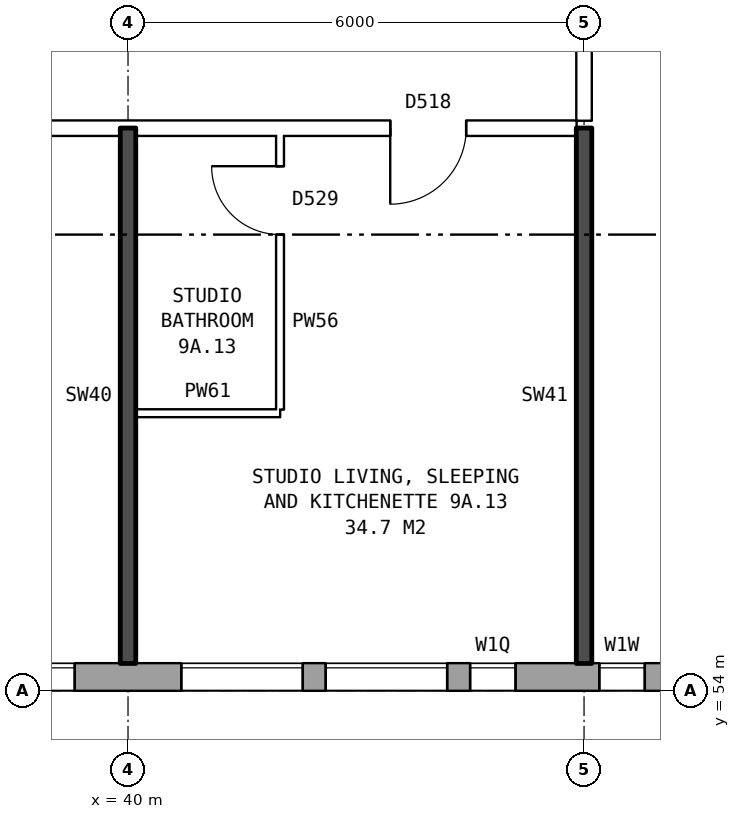
"""IFC4 building model, lengths in metres.
Left out: names, types, materials, properties, quantities, classifications, styles, units other than length and angle.
Written with IfcOpenShell. Run it as: python <this file> out.ifc"""

import sys

from ifc_helpers import new_model, si_unit, direction, frame, frame_2d, origin, place, context, subcontext, project, spatial, rectangle, extrude, element, fill, save


model = new_model("IFC4")
c1 = context("Model", 3, precision=1e-05, world=origin(), true_north=direction((0.0, 1.0)))
c2 = subcontext(c1, "Body", "Model", "MODEL_VIEW")
j1 = project(units=[si_unit("LENGTHUNIT", "METRE"), si_unit("PLANEANGLEUNIT", "RADIAN")], contexts=[c1])
p1 = place(None, origin())
s1 = spatial("IfcSite", under=j1, at=p1, CompositionType="ELEMENT")
p2 = place(p1, origin())
s2 = spatial("IfcBuilding", under=s1, at=p2, CompositionType="ELEMENT")
p3 = place(p2, frame((0.0, 0.0, 35.0)))
s3 = spatial("IfcBuildingStorey", under=s2, at=p3, CompositionType="ELEMENT", Elevation=35.0)
p4 = place(p3, frame((22.825, 54.18, 0.0), z_axis=(0.0, 0.0, 1.0), x_axis=(1.0, 0.0, 0.0)))
e1 = element("IfcWall", 1, at=p4, inside=s3, PredefinedType="STANDARD", context=c2, shape_type="SweptSolid", body=[
    extrude(rectangle(XDim=50.101, YDim=0.36, at=frame_2d((25.05, 0.0))), origin(), (0.0, 0.0, 1.0), 2.85),
])
p5 = place(p4, frame((2.875, 0.0, 0.8)))
e2 = element("IfcOpeningElement", 2, at=p5, cuts=e1, PredefinedType="OPENING", context=c2, shape_type="SweptSolid", body=[
    extrude(rectangle(XDim=1.6, YDim=1.8, at=frame_2d((0.8, 0.9))), frame((0.0, 0.19, 0.0), z_axis=(0.0, -1.0, 0.0), x_axis=(1.0, 0.0, 0.0)), (0.0, 0.0, 1.0), 0.38),
])
p6 = place(p4, frame((5.875, 0.0, 0.8)))
e3 = element("IfcOpeningElement", 3, at=p6, cuts=e1, PredefinedType="OPENING", context=c2, shape_type="SweptSolid", body=[
    extrude(rectangle(XDim=1.6, YDim=1.8, at=frame_2d((0.8, 0.9))), frame((0.0, 0.19, 0.0), z_axis=(0.0, -1.0, 0.0), x_axis=(1.0, 0.0, 0.0)), (0.0, 0.0, 1.0), 0.38),
])
p7 = place(p4, frame((8.875, 0.0, 0.8)))
e4 = element("IfcOpeningElement", 4, at=p7, cuts=e1, PredefinedType="OPENING", context=c2, shape_type="SweptSolid", body=[
    extrude(rectangle(XDim=1.6, YDim=1.8, at=frame_2d((0.8, 0.9))), frame((0.0, 0.19, 0.0), z_axis=(0.0, -1.0, 0.0), x_axis=(1.0, 0.0, 0.0)), (0.0, 0.0, 1.0), 0.38),
])
p8 = place(p4, frame((11.875, 0.0, 0.8)))
e5 = element("IfcOpeningElement", 5, at=p8, cuts=e1, PredefinedType="OPENING", context=c2, shape_type="SweptSolid", body=[
    extrude(rectangle(XDim=1.6, YDim=1.8, at=frame_2d((0.8, 0.9))), frame((0.0, 0.19, 0.0), z_axis=(0.0, -1.0, 0.0), x_axis=(1.0, 0.0, 0.0)), (0.0, 0.0, 1.0), 0.38),
])
p9 = place(p4, frame((14.875, 0.0, 0.8)))
e6 = element("IfcOpeningElement", 6, at=p9, cuts=e1, PredefinedType="OPENING", context=c2, shape_type="SweptSolid", body=[
    extrude(rectangle(XDim=1.6, YDim=1.8, at=frame_2d((0.8, 0.9))), frame((0.0, 0.19, 0.0), z_axis=(0.0, -1.0, 0.0), x_axis=(1.0, 0.0, 0.0)), (0.0, 0.0, 1.0), 0.38),
])
p10 = place(p4, frame((17.875, 0.0, 0.8)))
e7 = element("IfcOpeningElement", 7, at=p10, cuts=e1, PredefinedType="OPENING", context=c2, shape_type="SweptSolid", body=[
    extrude(rectangle(XDim=1.6, YDim=1.8, at=frame_2d((0.8, 0.9))), frame((0.0, 0.19, 0.0), z_axis=(0.0, -1.0, 0.0), x_axis=(1.0, 0.0, 0.0)), (0.0, 0.0, 1.0), 0.38),
])
p11 = place(p4, frame((19.775, 0.0, 0.8)))
e8 = element("IfcOpeningElement", 8, at=p11, cuts=e1, PredefinedType="OPENING", context=c2, shape_type="SweptSolid", body=[
    extrude(rectangle(XDim=1.6, YDim=1.8, at=frame_2d((0.8, 0.9))), frame((0.0, 0.19, 0.0), z_axis=(0.0, -1.0, 0.0), x_axis=(1.0, 0.0, 0.0)), (0.0, 0.0, 1.0), 0.38),
])
p12 = place(p4, frame((23.375, 0.0, 0.15)))
e9 = element("IfcOpeningElement", 9, at=p12, cuts=e1, PredefinedType="OPENING", context=c2, shape_type="SweptSolid", body=[
    extrude(rectangle(XDim=0.6, YDim=0.9, at=frame_2d((0.3, 0.45))), frame((0.0, 0.19, 0.0), z_axis=(0.0, -1.0, 0.0), x_axis=(1.0, 0.0, 0.0)), (0.0, 0.0, 1.0), 0.38),
])
p13 = place(p4, frame((27.275, 0.0, 1.7)))
e10 = element("IfcOpeningElement", 10, at=p13, cuts=e1, PredefinedType="OPENING", context=c2, shape_type="SweptSolid", body=[
    extrude(rectangle(XDim=0.6, YDim=0.9, at=frame_2d((0.3, 0.45))), frame((0.0, 0.19, 0.0), z_axis=(0.0, -1.0, 0.0), x_axis=(1.0, 0.0, 0.0)), (0.0, 0.0, 1.0), 0.38),
])
p14 = place(p4, frame((29.875, 0.0, 0.8)))
e11 = element("IfcOpeningElement", 11, at=p14, cuts=e1, PredefinedType="OPENING", context=c2, shape_type="SweptSolid", body=[
    extrude(rectangle(XDim=1.6, YDim=1.8, at=frame_2d((0.8, 0.9))), frame((0.0, 0.19, 0.0), z_axis=(0.0, -1.0, 0.0), x_axis=(1.0, 0.0, 0.0)), (0.0, 0.0, 1.0), 0.38),
])
p15 = place(p4, frame((32.875, 0.0, 0.8)))
e12 = element("IfcOpeningElement", 12, at=p15, cuts=e1, PredefinedType="OPENING", context=c2, shape_type="SweptSolid", body=[
    extrude(rectangle(XDim=1.6, YDim=1.8, at=frame_2d((0.8, 0.9))), frame((0.0, 0.19, 0.0), z_axis=(0.0, -1.0, 0.0), x_axis=(1.0, 0.0, 0.0)), (0.0, 0.0, 1.0), 0.38),
])
p16 = place(p4, frame((35.875, 0.0, 0.8)))
e13 = element("IfcOpeningElement", 13, at=p16, cuts=e1, PredefinedType="OPENING", context=c2, shape_type="SweptSolid", body=[
    extrude(rectangle(XDim=1.6, YDim=1.8, at=frame_2d((0.8, 0.9))), frame((0.0, 0.19, 0.0), z_axis=(0.0, -1.0, 0.0), x_axis=(1.0, 0.0, 0.0)), (0.0, 0.0, 1.0), 0.38),
])
p17 = place(p4, frame((38.875, 0.0, 0.8)))
e14 = element("IfcOpeningElement", 14, at=p17, cuts=e1, PredefinedType="OPENING", context=c2, shape_type="SweptSolid", body=[
    extrude(rectangle(XDim=1.6, YDim=1.8, at=frame_2d((0.8, 0.9))), frame((0.0, 0.19, 0.0), z_axis=(0.0, -1.0, 0.0), x_axis=(1.0, 0.0, 0.0)), (0.0, 0.0, 1.0), 0.38),
])
p18 = place(p4, frame((41.875, 0.0, 0.8)))
e15 = element("IfcOpeningElement", 15, at=p18, cuts=e1, PredefinedType="OPENING", context=c2, shape_type="SweptSolid", body=[
    extrude(rectangle(XDim=1.6, YDim=1.8, at=frame_2d((0.8, 0.9))), frame((0.0, 0.19, 0.0), z_axis=(0.0, -1.0, 0.0), x_axis=(1.0, 0.0, 0.0)), (0.0, 0.0, 1.0), 0.38),
])
p19 = place(p4, frame((44.875, 0.0, 0.8)))
e16 = element("IfcOpeningElement", 16, at=p19, cuts=e1, PredefinedType="OPENING", context=c2, shape_type="SweptSolid", body=[
    extrude(rectangle(XDim=1.6, YDim=1.8, at=frame_2d((0.8, 0.9))), frame((0.0, 0.19, 0.0), z_axis=(0.0, -1.0, 0.0), x_axis=(1.0, 0.0, 0.0)), (0.0, 0.0, 1.0), 0.38),
])
p20 = place(p4, frame((47.875, 0.0, 0.8)))
e17 = element("IfcOpeningElement", 17, at=p20, cuts=e1, PredefinedType="OPENING", context=c2, shape_type="SweptSolid", body=[
    extrude(rectangle(XDim=1.6, YDim=1.8, at=frame_2d((0.8, 0.9))), frame((0.0, 0.19, 0.0), z_axis=(0.0, -1.0, 0.0), x_axis=(1.0, 0.0, 0.0)), (0.0, 0.0, 1.0), 0.38),
])
p21 = place(p4, frame((21.675, 0.0, 1.4)))
e18 = element("IfcOpeningElement", 18, at=p21, cuts=e1, PredefinedType="OPENING", context=c2, shape_type="SweptSolid", body=[
    extrude(rectangle(XDim=0.6, YDim=1.2, at=frame_2d((0.3, 0.6))), frame((0.0, 0.19, 0.0), z_axis=(0.0, -1.0, 0.0), x_axis=(1.0, 0.0, 0.0)), (0.0, 0.0, 1.0), 0.38),
])
p22 = place(p4, frame((24.275, 0.0, 0.15)))
e19 = element("IfcOpeningElement", 19, at=p22, cuts=e1, PredefinedType="OPENING", context=c2, shape_type="SweptSolid", body=[
    extrude(rectangle(XDim=1.6, YDim=1.5, at=frame_2d((0.8, 0.75))), frame((0.0, 0.19, 0.0), z_axis=(0.0, -1.0, 0.0), x_axis=(1.0, 0.0, 0.0)), (0.0, 0.0, 1.0), 0.38),
])
p23 = place(p4, frame((28.175, 0.0, 1.1)))
e20 = element("IfcOpeningElement", 20, at=p23, cuts=e1, PredefinedType="OPENING", context=c2, shape_type="SweptSolid", body=[
    extrude(rectangle(XDim=0.8, YDim=1.5, at=frame_2d((0.4, 0.75))), frame((0.0, 0.19, 0.0), z_axis=(0.0, -1.0, 0.0), x_axis=(1.0, 0.0, 0.0)), (0.0, 0.0, 1.0), 0.38),
])
p24 = place(p3, frame((40.1, 57.65, 0.0), z_axis=(0.0, 0.0, 1.0), x_axis=(1.0, 0.0, 0.0)))
e21 = element("IfcWall", 21, at=p24, inside=s3, PredefinedType="PARTITIONING", context=c2, shape_type="SweptSolid", body=[
    extrude(rectangle(XDim=1.9, YDim=0.1, at=frame_2d((0.95, 0.0))), origin(), (0.0, 0.0, 1.0), 2.85),
])
p25 = place(p3, frame((20.11, 61.4, 0.0), z_axis=(0.0, 0.0, 1.0), x_axis=(1.0, 0.0, 0.0)))
e22 = element("IfcWall", 22, at=p25, inside=s3, PredefinedType="PARTITIONING", context=c2, shape_type="SweptSolid", body=[
    extrude(rectangle(XDim=25.79, YDim=0.2, at=frame_2d((12.895, 0.0))), origin(), (0.0, 0.0, 1.0), 2.85),
])
p26 = place(p25, frame((23.34, 0.0, 0.0)))
e23 = element("IfcOpeningElement", 23, at=p26, cuts=e22, PredefinedType="OPENING", context=c2, shape_type="SweptSolid", body=[
    extrude(rectangle(XDim=1.0, YDim=2.1, at=frame_2d((0.5, 1.05))), frame((0.0, 0.11, 0.0), z_axis=(0.0, -1.0, 0.0), x_axis=(1.0, 0.0, 0.0)), (0.0, 0.0, 1.0), 0.22),
])
p27 = place(p25, frame((17.39, 0.0, 0.0)))
e24 = element("IfcOpeningElement", 24, at=p27, cuts=e22, PredefinedType="OPENING", context=c2, shape_type="SweptSolid", body=[
    extrude(rectangle(XDim=1.0, YDim=2.1, at=frame_2d((0.5, 1.05))), frame((0.0, 0.11, 0.0), z_axis=(0.0, -1.0, 0.0), x_axis=(1.0, 0.0, 0.0)), (0.0, 0.0, 1.0), 0.22),
])
p28 = place(p25, frame((11.39, 0.0, 0.0)))
e25 = element("IfcOpeningElement", 25, at=p28, cuts=e22, PredefinedType="OPENING", context=c2, shape_type="SweptSolid", body=[
    extrude(rectangle(XDim=1.0, YDim=2.1, at=frame_2d((0.5, 1.05))), frame((0.0, 0.11, 0.0), z_axis=(0.0, -1.0, 0.0), x_axis=(1.0, 0.0, 0.0)), (0.0, 0.0, 1.0), 0.22),
])
p29 = place(p25, frame((2.245, 0.0, 0.0)))
e26 = element("IfcOpeningElement", 26, at=p29, cuts=e22, PredefinedType="OPENING", context=c2, shape_type="SweptSolid", body=[
    extrude(rectangle(XDim=1.0, YDim=2.1, at=frame_2d((0.5, 1.05))), frame((0.0, 0.11, 0.0), z_axis=(0.0, -1.0, 0.0), x_axis=(1.0, 0.0, 0.0)), (0.0, 0.0, 1.0), 0.22),
])
p30 = place(p3, frame((40.0, 54.36, 0.0), z_axis=(0.0, 0.0, 1.0), x_axis=(0.0, 1.0, 0.0)))
e27 = element("IfcWall", 27, at=p30, inside=s3, PredefinedType="SOLIDWALL", context=c2, shape_type="SweptSolid", body=[
    extrude(rectangle(XDim=7.04, YDim=0.2, at=frame_2d((3.52, 0.0))), origin(), (0.0, 0.0, 1.0), 2.85),
])
p31 = place(p3, frame((42.0, 57.7, 0.0), z_axis=(0.0, 0.0, 1.0), x_axis=(0.0, 1.0, 0.0)))
e28 = element("IfcWall", 28, at=p31, inside=s3, PredefinedType="PARTITIONING", context=c2, shape_type="SweptSolid", body=[
    extrude(rectangle(XDim=3.6, YDim=0.1, at=frame_2d((1.8, 0.0))), origin(), (0.0, 0.0, 1.0), 2.85),
])
p32 = place(p31, frame((2.3, 0.0, 0.0)))
e29 = element("IfcOpeningElement", 29, at=p32, cuts=e28, PredefinedType="OPENING", context=c2, shape_type="SweptSolid", body=[
    extrude(rectangle(XDim=0.9, YDim=2.1, at=frame_2d((0.45, 1.05))), frame((0.0, 0.06, 0.0), z_axis=(0.0, -1.0, 0.0), x_axis=(1.0, 0.0, 0.0)), (0.0, 0.0, 1.0), 0.12),
])
p33 = place(p3, frame((46.0, 54.36, 0.0), z_axis=(0.0, 0.0, 1.0), x_axis=(0.0, 1.0, 0.0)))
e30 = element("IfcWall", 30, at=p33, inside=s3, PredefinedType="SOLIDWALL", context=c2, shape_type="SweptSolid", body=[
    extrude(rectangle(XDim=7.04, YDim=0.2, at=frame_2d((3.52, 0.0))), origin(), (0.0, 0.0, 1.0), 2.85),
])
p34 = place(p3, frame((46.0, 61.5, 0.0), z_axis=(0.0, 0.0, 1.0), x_axis=(0.0, 1.0, 0.0)))
e31 = element("IfcWall", 31, at=p34, inside=s3, PredefinedType="PARTITIONING", context=c2, shape_type="SweptSolid", body=[
    extrude(rectangle(XDim=2.2, YDim=0.2, at=frame_2d((1.1, 0.0))), origin(), (0.0, 0.0, 1.0), 2.85),
])
p35 = place(p9, origin())
e32 = element("IfcWindow", 32, at=p35, inside=s3, PartitioningType="SINGLE_PANEL", PredefinedType="WINDOW", context=c2, shape_type="SweptSolid", body=[
    extrude(rectangle(XDim=1.6, YDim=1.8, at=frame_2d((0.8, 0.9))), frame((0.0, 0.15, 0.0), z_axis=(0.0, -1.0, 0.0), x_axis=(1.0, 0.0, 0.0)), (0.0, 0.0, 1.0), 0.06),
])
fill(e6, e32)
p36 = place(p10, origin())
e33 = element("IfcWindow", 33, at=p36, inside=s3, PartitioningType="SINGLE_PANEL", PredefinedType="WINDOW", context=c2, shape_type="SweptSolid", body=[
    extrude(rectangle(XDim=1.6, YDim=1.8, at=frame_2d((0.8, 0.9))), frame((0.0, 0.15, 0.0), z_axis=(0.0, -1.0, 0.0), x_axis=(1.0, 0.0, 0.0)), (0.0, 0.0, 1.0), 0.06),
])
fill(e7, e33)
p37 = place(p11, origin())
e34 = element("IfcWindow", 34, at=p37, inside=s3, PartitioningType="SINGLE_PANEL", PredefinedType="WINDOW", context=c2, shape_type="SweptSolid", body=[
    extrude(rectangle(XDim=1.6, YDim=1.8, at=frame_2d((0.8, 0.9))), frame((0.0, 0.15, 0.0), z_axis=(0.0, -1.0, 0.0), x_axis=(1.0, 0.0, 0.0)), (0.0, 0.0, 1.0), 0.06),
])
fill(e8, e34)
p38 = place(p12, origin())
e35 = element("IfcWindow", 35, at=p38, inside=s3, PartitioningType="SINGLE_PANEL", PredefinedType="WINDOW", context=c2, shape_type="SweptSolid", body=[
    extrude(rectangle(XDim=0.6, YDim=0.9, at=frame_2d((0.3, 0.45))), frame((0.0, 0.15, 0.0), z_axis=(0.0, -1.0, 0.0), x_axis=(1.0, 0.0, 0.0)), (0.0, 0.0, 1.0), 0.06),
])
fill(e9, e35)
p39 = place(p26, frame((1.0, 0.0, 0.0), z_axis=(0.0, 0.0, 1.0), x_axis=(-1.0, 0.0, 0.0)))
e36 = element("IfcDoor", 36, at=p39, inside=s3, OperationType="SINGLE_SWING_RIGHT", PredefinedType="DOOR", context=c2, shape_type="SweptSolid", body=[
    extrude(rectangle(XDim=1.0, YDim=2.1, at=frame_2d((0.5, 1.05))), frame((0.0, 0.025, 0.0), z_axis=(0.0, -1.0, 0.0), x_axis=(1.0, 0.0, 0.0)), (0.0, 0.0, 1.0), 0.05),
])
fill(e23, e36)
p40 = place(p32, origin())
e37 = element("IfcDoor", 37, at=p40, inside=s3, OperationType="SINGLE_SWING_RIGHT", PredefinedType="DOOR", context=c2, shape_type="SweptSolid", body=[
    extrude(rectangle(XDim=0.9, YDim=2.1, at=frame_2d((0.45, 1.05))), frame((0.0, 0.025, 0.0), z_axis=(0.0, -1.0, 0.0), x_axis=(1.0, 0.0, 0.0)), (0.0, 0.0, 1.0), 0.05),
])
fill(e29, e37)
p41 = place(p21, origin())
e38 = element("IfcWindow", 38, at=p41, inside=s3, PartitioningType="SINGLE_PANEL", PredefinedType="WINDOW", context=c2, shape_type="SweptSolid", body=[
    extrude(rectangle(XDim=0.6, YDim=1.2, at=frame_2d((0.3, 0.6))), frame((0.0, 0.15, 0.0), z_axis=(0.0, -1.0, 0.0), x_axis=(1.0, 0.0, 0.0)), (0.0, 0.0, 1.0), 0.06),
])
fill(e18, e38)
save(model, sys.argv[1])
